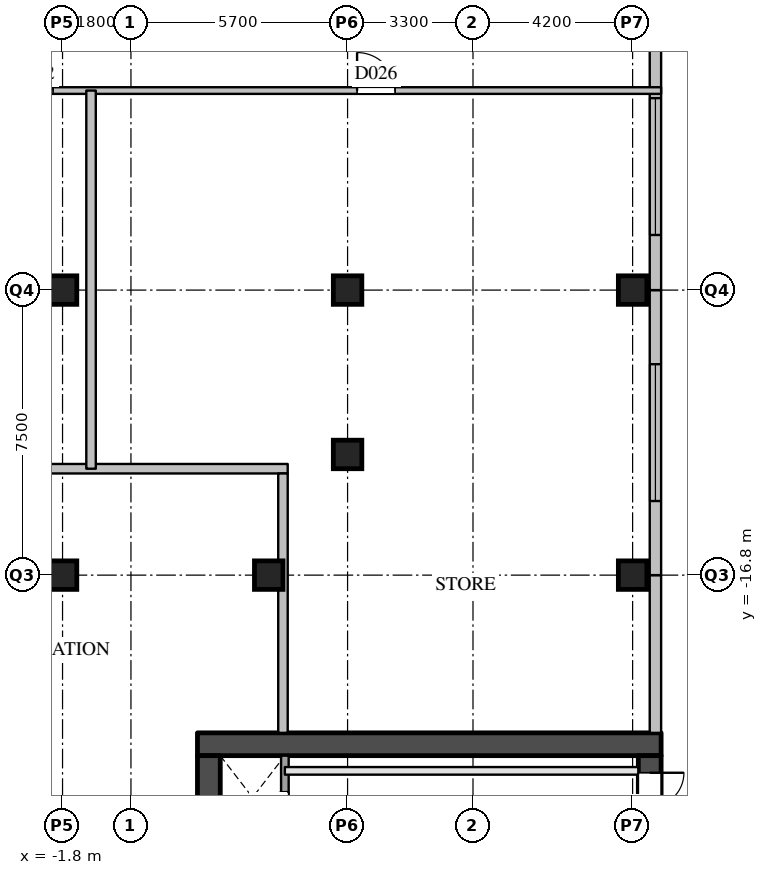
"""IFC4 building model, lengths in metres.
Left out: names, types, materials, properties, quantities, classifications, styles, units other than length and angle.
Written with IfcOpenShell. Run it as: python <this file> out.ifc"""

import sys

from ifc_helpers import new_model, si_unit, direction, frame, frame_2d, origin, origin_2d, place, context, subcontext, project, spatial, rectangle, extrude, element, fill, save


model = new_model("IFC4")
c1 = context("Model", 3, precision=1e-05, world=origin(), true_north=direction((0.0, 1.0)))
c2 = subcontext(c1, "Body", "Model", "MODEL_VIEW")
j1 = project(units=[si_unit("LENGTHUNIT", "METRE"), si_unit("PLANEANGLEUNIT", "RADIAN")], contexts=[c1])
p1 = place(None, origin())
s1 = spatial("IfcSite", under=j1, at=p1, CompositionType="ELEMENT")
p2 = place(p1, origin())
s2 = spatial("IfcBuilding", under=s1, at=p2, CompositionType="ELEMENT")
p3 = place(p2, origin())
s3 = spatial("IfcBuildingStorey", under=s2, at=p3, CompositionType="ELEMENT", Elevation=0.0)
for number, where, z_axis, x_axis in (
    (1, (-1.8, -16.8, 0.0), (0.0, 0.0, 1.0), (1.0, 0.0, 0.0)),
    (2, (-1.8, -9.3, 0.0), (0.0, 0.0, 1.0), (1.0, 0.0, 0.0)),
    (3, (5.7, -9.3, 0.0), (0.0, 0.0, 1.0), (1.0, 0.0, 0.0)),
    (4, (13.2, -16.8, 0.0), (0.0, 0.0, 1.0), (1.0, 0.0, 0.0)),
    (5, (13.2, -9.3, 0.0), (0.0, 0.0, 1.0), (1.0, 0.0, 0.0)),
    (6, (3.625, -16.8, 0.0), (0.0, 0.0, 1.0), (1.0, 0.0, 0.0)),
    (7, (5.7, -13.625, 0.0), (0.0, 0.0, 1.0), (1.0, 0.0, 0.0)),
):
    element("IfcColumn", number, at=place(p3, frame(where, z_axis=z_axis, x_axis=x_axis)), inside=s3, PredefinedType="COLUMN", context=c2, shape_type="SweptSolid", body=[
        extrude(rectangle(XDim=0.75, YDim=0.75, at=origin_2d()), origin(), (0.0, 0.0, 1.0), 8.0),
    ])
p4 = place(p3, frame((13.8, -20.95, 0.0), z_axis=(0.0, 0.0, 1.0), x_axis=(0.0, 1.0, 0.0)))
e8 = element("IfcWall", 8, at=p4, inside=s3, PredefinedType="SOLIDWALL", context=c2, shape_type="SweptSolid", body=[
    extrude(rectangle(XDim=4.15, YDim=0.3, at=frame_2d((2.075, 0.0))), origin(), (0.0, 0.0, 1.0), 7.59),
])
p5 = place(p3, frame((13.8, -16.8, 0.0), z_axis=(0.0, 0.0, 1.0), x_axis=(0.0, 1.0, 0.0)))
e9 = element("IfcWall", 9, at=p5, inside=s3, PredefinedType="SOLIDWALL", context=c2, shape_type="SweptSolid", body=[
    extrude(rectangle(XDim=7.5, YDim=0.3, at=frame_2d((3.75, 0.0))), origin(), (0.0, 0.0, 1.0), 7.59),
])
p6 = place(p5, frame((1.95, 0.0, 0.9)))
e10 = element("IfcOpeningElement", 10, at=p6, cuts=e9, PredefinedType="OPENING", context=c2, shape_type="SweptSolid", body=[
    extrude(rectangle(XDim=3.6, YDim=3.0, at=frame_2d((1.8, 1.5))), frame((0.0, 0.16, 0.0), z_axis=(0.0, -1.0, 0.0), x_axis=(1.0, 0.0, 0.0)), (0.0, 0.0, 1.0), 0.32),
])
p7 = place(p3, frame((13.8, -9.3, 0.0), z_axis=(0.0, 0.0, 1.0), x_axis=(0.0, 1.0, 0.0)))
e11 = element("IfcWall", 11, at=p7, inside=s3, PredefinedType="SOLIDWALL", context=c2, shape_type="SweptSolid", body=[
    extrude(rectangle(XDim=7.5, YDim=0.3, at=frame_2d((3.75, 0.0))), origin(), (0.0, 0.0, 1.0), 7.59),
])
p8 = place(p7, frame((1.45, 0.0, 0.9)))
e12 = element("IfcOpeningElement", 12, at=p8, cuts=e11, PredefinedType="OPENING", context=c2, shape_type="SweptSolid", body=[
    extrude(rectangle(XDim=3.6, YDim=3.0, at=frame_2d((1.8, 1.5))), frame((0.0, 0.16, 0.0), z_axis=(0.0, -1.0, 0.0), x_axis=(1.0, 0.0, 0.0)), (0.0, 0.0, 1.0), 0.32),
])
p9 = place(p3, frame((1.75, -21.25, 0.0), z_axis=(0.0, 0.0, 1.0), x_axis=(1.0, 0.0, 0.0)))
e13 = element("IfcWall", 13, at=p9, inside=s3, PredefinedType="SHEAR", context=c2, shape_type="SweptSolid", body=[
    extrude(rectangle(XDim=12.2, YDim=0.6, at=frame_2d((6.1, 0.0))), origin(), (0.0, 0.0, 1.0), 7.59),
])
p10 = place(p3, frame((2.05, -31.95, 0.0), z_axis=(0.0, 0.0, 1.0), x_axis=(0.0, 1.0, 0.0)))
e14 = element("IfcWall", 14, at=p10, inside=s3, PredefinedType="SHEAR", context=c2, shape_type="SweptSolid", body=[
    extrude(rectangle(XDim=10.4, YDim=0.6, at=frame_2d((5.2, 0.0))), origin(), (0.0, 0.0, 1.0), 7.59),
])
p11 = place(p10, frame((3.65, 0.0, 0.0)))
e15 = element("IfcOpeningElement", 15, at=p11, cuts=e14, PredefinedType="OPENING", context=c2, shape_type="SweptSolid", body=[
    extrude(rectangle(XDim=1.8, YDim=2.1, at=frame_2d((0.9, 1.05))), frame((0.0, 0.31, 0.0), z_axis=(0.0, -1.0, 0.0), x_axis=(1.0, 0.0, 0.0)), (0.0, 0.0, 1.0), 0.62),
])
p12 = place(p3, frame((13.65, -31.95, 0.0), z_axis=(0.0, 0.0, 1.0), x_axis=(0.0, 1.0, 0.0)))
e16 = element("IfcWall", 16, at=p12, inside=s3, PredefinedType="SHEAR", context=c2, shape_type="SweptSolid", body=[
    extrude(rectangle(XDim=10.4, YDim=0.6, at=frame_2d((5.2, 0.0))), origin(), (0.0, 0.0, 1.0), 7.59),
])
p13 = place(p12, frame((7.25, 0.0, 0.0), z_axis=(0.0, 0.0, 1.0), x_axis=(-1.0, 0.0, 0.0)))
e17 = element("IfcOpeningElement", 17, at=p13, cuts=e16, PredefinedType="OPENING", context=c2, shape_type="SweptSolid", body=[
    extrude(rectangle(XDim=1.0, YDim=2.1, at=frame_2d((0.5, 1.05))), frame((0.0, 0.31, 0.0), z_axis=(0.0, -1.0, 0.0), x_axis=(1.0, 0.0, 0.0)), (0.0, 0.0, 1.0), 0.62),
])
p14 = place(p12, frame((9.95, 0.0, 0.0), z_axis=(0.0, 0.0, 1.0), x_axis=(-1.0, 0.0, 0.0)))
e18 = element("IfcOpeningElement", 18, at=p14, cuts=e16, PredefinedType="OPENING", context=c2, shape_type="SweptSolid", body=[
    extrude(rectangle(XDim=1.8, YDim=2.4, at=frame_2d((0.9, 1.2))), frame((0.0, 0.31, 0.0), z_axis=(0.0, -1.0, 0.0), x_axis=(1.0, 0.0, 0.0)), (0.0, 0.0, 1.0), 0.62),
])
p15 = place(p3, frame((4.05, -23.75, 0.0), z_axis=(0.0, 0.0, 1.0), x_axis=(0.0, 1.0, 0.0)))
e19 = element("IfcWall", 19, at=p15, inside=s3, PredefinedType="SOLIDWALL", context=c2, shape_type="SweptSolid", body=[
    extrude(rectangle(XDim=2.2, YDim=0.2, at=frame_2d((1.1, 0.0))), origin(), (0.0, 0.0, 1.0), 7.59),
])
p16 = place(p15, frame((0.55, 0.0, 0.0)))
e20 = element("IfcOpeningElement", 20, at=p16, cuts=e19, PredefinedType="OPENING", context=c2, shape_type="SweptSolid", body=[
    extrude(rectangle(XDim=0.7, YDim=2.1, at=frame_2d((0.35, 1.05))), frame((0.0, 0.11, 0.0), z_axis=(0.0, -1.0, 0.0), x_axis=(1.0, 0.0, 0.0)), (0.0, 0.0, 1.0), 0.22),
])
p17 = place(p3, frame((4.05, -21.95, 0.0), z_axis=(0.0, 0.0, 1.0), x_axis=(1.0, 0.0, 0.0)))
e21 = element("IfcWall", 21, at=p17, inside=s3, PredefinedType="PARTITIONING", context=c2, shape_type="SweptSolid", body=[
    extrude(rectangle(XDim=9.3, YDim=0.2, at=frame_2d((4.65, 0.0))), origin(), (0.0, 0.0, 1.0), 7.59),
])
p18 = place(p3, frame((-4.05, -4.05, 0.0), z_axis=(0.0, 0.0, 1.0), x_axis=(1.0, 0.0, 0.0)))
e22 = element("IfcWall", 22, at=p18, inside=s3, PredefinedType="PARTITIONING", context=c2, shape_type="SweptSolid", body=[
    extrude(rectangle(XDim=18.0, YDim=0.175, at=frame_2d((9.0, 0.0))), origin(), (0.0, 0.0, 1.0), 6.79),
])
p19 = place(p18, frame((1.0, 0.0, 0.0)))
e23 = element("IfcOpeningElement", 23, at=p19, cuts=e22, PredefinedType="OPENING", context=c2, shape_type="SweptSolid", body=[
    extrude(rectangle(XDim=1.0, YDim=2.1, at=frame_2d((0.5, 1.05))), frame((0.0, 0.097, 0.0), z_axis=(0.0, -1.0, 0.0), x_axis=(1.0, 0.0, 0.0)), (0.0, 0.0, 1.0), 0.195),
])
p20 = place(p18, frame((10.0, 0.0, 0.0)))
e24 = element("IfcOpeningElement", 24, at=p20, cuts=e22, PredefinedType="OPENING", context=c2, shape_type="SweptSolid", body=[
    extrude(rectangle(XDim=1.0, YDim=2.1, at=frame_2d((0.5, 1.05))), frame((0.0, 0.097, 0.0), z_axis=(0.0, -1.0, 0.0), x_axis=(1.0, 0.0, 0.0)), (0.0, 0.0, 1.0), 0.195),
])
p21 = place(p3, frame((-9.3, -14.0, 0.0), z_axis=(0.0, 0.0, 1.0), x_axis=(1.0, 0.0, 0.0)))
e25 = element("IfcWall", 25, at=p21, inside=s3, PredefinedType="PARTITIONING", context=c2, shape_type="SweptSolid", body=[
    extrude(rectangle(XDim=13.425, YDim=0.25, at=frame_2d((6.712, 0.0))), origin(), (0.0, 0.0, 1.0), 6.79),
])
p22 = place(p3, frame((-1.05, -14.0, 0.0), z_axis=(0.0, 0.0, 1.0), x_axis=(0.0, 1.0, 0.0)))
e26 = element("IfcWall", 26, at=p22, inside=s3, PredefinedType="PARTITIONING", context=c2, shape_type="SweptSolid", body=[
    extrude(rectangle(XDim=9.95, YDim=0.25, at=frame_2d((4.975, 0.0))), origin(), (0.0, 0.0, 1.0), 6.79),
])
p23 = place(p3, frame((4.0, -20.95, 0.0), z_axis=(0.0, 0.0, 1.0), x_axis=(0.0, 1.0, 0.0)))
e27 = element("IfcWall", 27, at=p23, inside=s3, PredefinedType="PARTITIONING", context=c2, shape_type="SweptSolid", body=[
    extrude(rectangle(XDim=6.825, YDim=0.25, at=frame_2d((3.413, 0.0))), origin(), (0.0, 0.0, 1.0), 7.59),
])
p24 = place(p6, origin())
e28 = element("IfcWindow", 28, at=p24, inside=s3, PartitioningType="SINGLE_PANEL", PredefinedType="WINDOW", context=c2, shape_type="SweptSolid", body=[
    extrude(rectangle(XDim=3.6, YDim=3.0, at=frame_2d((1.8, 1.5))), frame((0.0, 0.03, 0.0), z_axis=(0.0, -1.0, 0.0), x_axis=(1.0, 0.0, 0.0)), (0.0, 0.0, 1.0), 0.06),
])
fill(e10, e28)
p25 = place(p8, origin())
e29 = element("IfcWindow", 29, at=p25, inside=s3, PartitioningType="SINGLE_PANEL", PredefinedType="WINDOW", context=c2, shape_type="SweptSolid", body=[
    extrude(rectangle(XDim=3.6, YDim=3.0, at=frame_2d((1.8, 1.5))), frame((0.0, 0.03, 0.0), z_axis=(0.0, -1.0, 0.0), x_axis=(1.0, 0.0, 0.0)), (0.0, 0.0, 1.0), 0.06),
])
fill(e12, e29)
p26 = place(p16, origin())
e30 = element("IfcDoor", 30, at=p26, inside=s3, OperationType="SINGLE_SWING_LEFT", PredefinedType="DOOR", context=c2, shape_type="SweptSolid", body=[
    extrude(rectangle(XDim=0.7, YDim=2.1, at=frame_2d((0.35, 1.05))), frame((0.0, 0.025, 0.0), z_axis=(0.0, -1.0, 0.0), x_axis=(1.0, 0.0, 0.0)), (0.0, 0.0, 1.0), 0.05),
])
fill(e20, e30)
p27 = place(p14, origin())
e31 = element("IfcDoor", 31, at=p27, inside=s3, OperationType="DOUBLE_DOOR_SINGLE_SWING", PredefinedType="DOOR", context=c2, shape_type="SweptSolid", body=[
    extrude(rectangle(XDim=1.8, YDim=2.4, at=frame_2d((0.9, 1.2))), frame((0.0, 0.025, 0.0), z_axis=(0.0, -1.0, 0.0), x_axis=(1.0, 0.0, 0.0)), (0.0, 0.0, 1.0), 0.05),
])
fill(e18, e31)
p28 = place(p20, origin())
e32 = element("IfcDoor", 32, at=p28, inside=s3, OperationType="SINGLE_SWING_LEFT", PredefinedType="DOOR", context=c2, shape_type="SweptSolid", body=[
    extrude(rectangle(XDim=1.0, YDim=2.1, at=frame_2d((0.5, 1.05))), frame((0.0, 0.025, 0.0), z_axis=(0.0, -1.0, 0.0), x_axis=(1.0, 0.0, 0.0)), (0.0, 0.0, 1.0), 0.05),
])
fill(e24, e32)
save(model, sys.argv[1])
